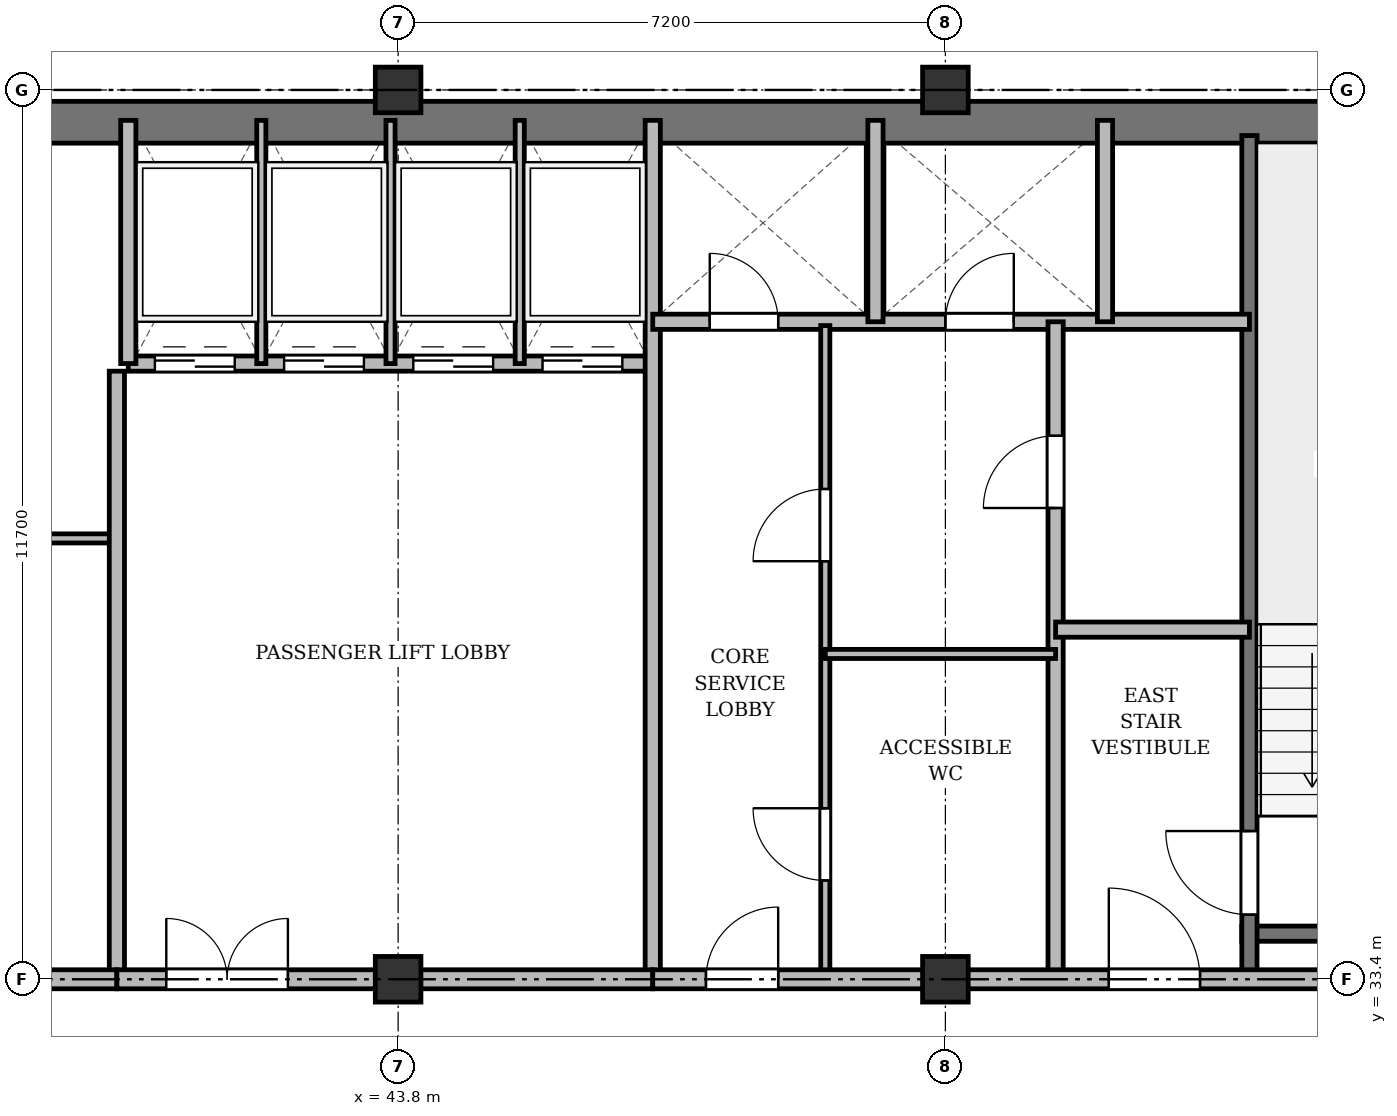
"""IFC4 building model, lengths in metres.
Left out: names, types, materials, properties, quantities, classifications, styles, units other than length and angle.
Written with IfcOpenShell. Run it as: python <this file> out.ifc"""

import sys

from ifc_helpers import new_model, si_unit, direction, frame, frame_2d, origin, origin_2d, place, context, subcontext, project, spatial, rectangle, extrude, source, transform, mapped, element, fill, save


model = new_model("IFC4")
c1 = context("Model", 3, precision=1e-05, world=origin(), true_north=direction((0.0, 1.0)))
c2 = subcontext(c1, "Body", "Model", "MODEL_VIEW")
j1 = project(units=[si_unit("LENGTHUNIT", "METRE"), si_unit("PLANEANGLEUNIT", "RADIAN")], contexts=[c1])
p1 = place(None, origin())
s1 = spatial("IfcSite", under=j1, at=p1, CompositionType="ELEMENT")
p2 = place(p1, origin())
s2 = spatial("IfcBuilding", under=s1, at=p2, CompositionType="ELEMENT")
p3 = place(p2, frame((0.0, 0.0, 263.1)))
s3 = spatial("IfcBuildingStorey", under=s2, at=p3, CompositionType="ELEMENT", Elevation=263.1)
m1 = source(origin(), c2, "Body", "SweptSolid", [
    extrude(rectangle(XDim=0.6, YDim=0.6, at=origin_2d()), origin(), (0.0, 0.0, 1.0), 3.6),
])
for number, where, z_axis, x_axis in (
    (1, (43.8, 33.4, 0.0), (0.0, 0.0, 1.0), (1.0, 0.0, 0.0)),
    (2, (43.8, 45.1, 0.0), (0.0, 0.0, 1.0), (1.0, 0.0, 0.0)),
    (3, (51.0, 33.4, 0.0), (0.0, 0.0, 1.0), (1.0, 0.0, 0.0)),
    (4, (51.0, 45.1, 0.0), (0.0, 0.0, 1.0), (1.0, 0.0, 0.0)),
):
    element("IfcColumn", number, at=place(p3, frame(where, z_axis=z_axis, x_axis=x_axis)), inside=s3, PredefinedType="COLUMN", context=c2, shape_type="MappedRepresentation", body=[
        mapped(m1, transform((0.0, 0.0, 0.0), x_axis=(1.0, 0.0, 0.0), y_axis=(0.0, 1.0, 0.0), z_axis=(0.0, 0.0, 1.0), scale=1.0)),
    ])
p4 = place(p3, frame((15.65, 44.675, 0.0), z_axis=(0.0, 0.0, 1.0), x_axis=(1.0, 0.0, 0.0)))
e5 = element("IfcWall", 5, at=p4, inside=s3, PredefinedType="SHEAR", context=c2, shape_type="SweptSolid", body=[
    extrude(rectangle(XDim=43.1, YDim=0.55, at=frame_2d((21.55, 0.0))), origin(), (0.0, 0.0, 1.0), 3.37),
])
p5 = place(p3, frame((54.9, 34.0, 0.0), z_axis=(0.0, 0.0, 1.0), x_axis=(1.0, 0.0, 0.0)))
e6 = element("IfcWall", 6, at=p5, inside=s3, PredefinedType="SHEAR", context=c2, shape_type="SweptSolid", body=[
    extrude(rectangle(XDim=3.4, YDim=0.2, at=frame_2d((1.7, 0.0))), origin(), (0.0, 0.0, 1.0), 3.37),
])
p6 = place(p3, frame((55.0, 33.4, 0.0), z_axis=(0.0, 0.0, 1.0), x_axis=(0.0, 1.0, 0.0)))
e7 = element("IfcWall", 7, at=p6, inside=s3, PredefinedType="SHEAR", context=c2, shape_type="SweptSolid", body=[
    extrude(rectangle(XDim=11.1, YDim=0.2, at=frame_2d((5.55, 0.0))), origin(), (0.0, 0.0, 1.0), 3.37),
])
p7 = place(p6, frame((0.85, 0.0, 0.0)))
e8 = element("IfcOpeningElement", 8, at=p7, cuts=e7, PredefinedType="OPENING", context=c2, shape_type="SweptSolid", body=[
    extrude(rectangle(XDim=1.1, YDim=2.15, at=frame_2d((0.55, 1.075))), frame((0.0, 0.11, 0.0), z_axis=(0.0, -1.0, 0.0), x_axis=(1.0, 0.0, 0.0)), (0.0, 0.0, 1.0), 0.22),
])
p8 = place(p3, frame((33.3, 39.2, 0.0), z_axis=(0.0, 0.0, 1.0), x_axis=(1.0, 0.0, 0.0)))
e9 = element("IfcWall", 9, at=p8, inside=s3, PredefinedType="PARTITIONING", context=c2, shape_type="SweptSolid", body=[
    extrude(rectangle(XDim=6.8, YDim=0.12, at=frame_2d((3.4, 0.0))), origin(), (0.0, 0.0, 1.0), 3.37),
])
p9 = place(p8, frame((2.6, 0.0, 0.0)))
e10 = element("IfcOpeningElement", 10, at=p9, cuts=e9, PredefinedType="OPENING", context=c2, shape_type="SweptSolid", body=[
    extrude(rectangle(XDim=0.95, YDim=2.15, at=frame_2d((0.475, 1.075))), frame((0.0, 0.07, 0.0), z_axis=(0.0, -1.0, 0.0), x_axis=(1.0, 0.0, 0.0)), (0.0, 0.0, 1.0), 0.14),
])
p10 = place(p3, frame((40.1, 33.4, 0.0), z_axis=(0.0, 0.0, 1.0), x_axis=(0.0, 1.0, 0.0)))
e11 = element("IfcWall", 11, at=p10, inside=s3, PredefinedType="SOLIDWALL", context=c2, shape_type="SweptSolid", body=[
    extrude(rectangle(XDim=8.0, YDim=0.2, at=frame_2d((4.0, 0.0))), origin(), (0.0, 0.0, 1.0), 2.92),
])
p11 = place(p3, frame((40.25, 41.5, 0.0), z_axis=(0.0, 0.0, 1.0), x_axis=(1.0, 0.0, 0.0)))
e12 = element("IfcWall", 12, at=p11, inside=s3, PredefinedType="SOLIDWALL", context=c2, shape_type="SweptSolid", body=[
    extrude(rectangle(XDim=6.9, YDim=0.2, at=frame_2d((3.45, 0.0))), origin(), (0.0, 0.0, 1.0), 3.37),
])
p12 = place(p11, frame((0.35, 0.0, 0.0)))
e13 = element("IfcOpeningElement", 13, at=p12, cuts=e12, PredefinedType="OPENING", context=c2, shape_type="SweptSolid", body=[
    extrude(rectangle(XDim=1.05, YDim=2.15, at=frame_2d((0.525, 1.075))), frame((0.0, 0.11, 0.0), z_axis=(0.0, -1.0, 0.0), x_axis=(1.0, 0.0, 0.0)), (0.0, 0.0, 1.0), 0.22),
])
p13 = place(p11, frame((2.05, 0.0, 0.0)))
e14 = element("IfcOpeningElement", 14, at=p13, cuts=e12, PredefinedType="OPENING", context=c2, shape_type="SweptSolid", body=[
    extrude(rectangle(XDim=1.05, YDim=2.15, at=frame_2d((0.525, 1.075))), frame((0.0, 0.11, 0.0), z_axis=(0.0, -1.0, 0.0), x_axis=(1.0, 0.0, 0.0)), (0.0, 0.0, 1.0), 0.22),
])
p14 = place(p11, frame((3.75, 0.0, 0.0)))
e15 = element("IfcOpeningElement", 15, at=p14, cuts=e12, PredefinedType="OPENING", context=c2, shape_type="SweptSolid", body=[
    extrude(rectangle(XDim=1.05, YDim=2.15, at=frame_2d((0.525, 1.075))), frame((0.0, 0.11, 0.0), z_axis=(0.0, -1.0, 0.0), x_axis=(1.0, 0.0, 0.0)), (0.0, 0.0, 1.0), 0.22),
])
p15 = place(p11, frame((5.45, 0.0, 0.0)))
e16 = element("IfcOpeningElement", 16, at=p15, cuts=e12, PredefinedType="OPENING", context=c2, shape_type="SweptSolid", body=[
    extrude(rectangle(XDim=1.05, YDim=2.15, at=frame_2d((0.525, 1.075))), frame((0.0, 0.11, 0.0), z_axis=(0.0, -1.0, 0.0), x_axis=(1.0, 0.0, 0.0)), (0.0, 0.0, 1.0), 0.22),
])
p16 = place(p3, frame((40.25, 41.5, 0.0), z_axis=(0.0, 0.0, 1.0), x_axis=(0.0, 1.0, 0.0)))
e17 = element("IfcWall", 17, at=p16, inside=s3, PredefinedType="SOLIDWALL", context=c2, shape_type="SweptSolid", body=[
    extrude(rectangle(XDim=3.2, YDim=0.2, at=frame_2d((1.6, 0.0))), origin(), (0.0, 0.0, 1.0), 3.37),
])
for number, where, z_axis, x_axis in (
    (18, (42.0, 41.5, 0.0), (0.0, 0.0, 1.0), (0.0, 1.0, 0.0)),
    (19, (43.7, 41.5, 0.0), (0.0, 0.0, 1.0), (0.0, 1.0, 0.0)),
    (20, (45.4, 41.5, 0.0), (0.0, 0.0, 1.0), (0.0, 1.0, 0.0)),
):
    element("IfcWall", number, at=place(p3, frame(where, z_axis=z_axis, x_axis=x_axis)), inside=s3, PredefinedType="PARTITIONING", context=c2, shape_type="SweptSolid", body=[
        extrude(rectangle(XDim=3.2, YDim=0.12, at=frame_2d((1.6, 0.0))), origin(), (0.0, 0.0, 1.0), 3.37),
    ])
p17 = place(p3, frame((47.15, 33.4, 0.0), z_axis=(0.0, 0.0, 1.0), x_axis=(0.0, 1.0, 0.0)))
e21 = element("IfcWall", 21, at=p17, inside=s3, PredefinedType="SOLIDWALL", context=c2, shape_type="SweptSolid", body=[
    extrude(rectangle(XDim=11.3, YDim=0.2, at=frame_2d((5.65, 0.0))), origin(), (0.0, 0.0, 1.0), 2.92),
])
p18 = place(p3, frame((33.3, 33.4, 0.0), z_axis=(0.0, 0.0, 1.0), x_axis=(1.0, 0.0, 0.0)))
e22 = element("IfcWall", 22, at=p18, inside=s3, PredefinedType="PARTITIONING", context=c2, shape_type="SweptSolid", body=[
    extrude(rectangle(XDim=6.8, YDim=0.25, at=frame_2d((3.4, 0.0))), origin(), (0.0, 0.0, 1.0), 2.92),
])
p19 = place(p18, frame((2.4, 0.0, 0.0)))
e23 = element("IfcOpeningElement", 23, at=p19, cuts=e22, PredefinedType="OPENING", context=c2, shape_type="SweptSolid", body=[
    extrude(rectangle(XDim=1.0, YDim=2.15, at=frame_2d((0.5, 1.075))), frame((0.0, 0.135, 0.0), z_axis=(0.0, -1.0, 0.0), x_axis=(1.0, 0.0, 0.0)), (0.0, 0.0, 1.0), 0.27),
])
p20 = place(p3, frame((40.1, 33.4, 0.0), z_axis=(0.0, 0.0, 1.0), x_axis=(1.0, 0.0, 0.0)))
e24 = element("IfcWall", 24, at=p20, inside=s3, PredefinedType="PARTITIONING", context=c2, shape_type="SweptSolid", body=[
    extrude(rectangle(XDim=7.05, YDim=0.25, at=frame_2d((3.525, 0.0))), origin(), (0.0, 0.0, 1.0), 2.92),
])
p21 = place(p20, frame((0.65, 0.0, 0.0)))
e25 = element("IfcOpeningElement", 25, at=p21, cuts=e24, PredefinedType="OPENING", context=c2, shape_type="SweptSolid", body=[
    extrude(rectangle(XDim=1.6, YDim=2.2, at=frame_2d((0.8, 1.1))), frame((0.0, 0.135, 0.0), z_axis=(0.0, -1.0, 0.0), x_axis=(1.0, 0.0, 0.0)), (0.0, 0.0, 1.0), 0.27),
])
p22 = place(p3, frame((47.15, 42.05, 0.0), z_axis=(0.0, 0.0, 1.0), x_axis=(1.0, 0.0, 0.0)))
e26 = element("IfcWall", 26, at=p22, inside=s3, PredefinedType="SOLIDWALL", context=c2, shape_type="SweptSolid", body=[
    extrude(rectangle(XDim=7.85, YDim=0.2, at=frame_2d((3.925, 0.0))), origin(), (0.0, 0.0, 1.0), 2.87),
])
p23 = place(p22, frame((0.75, 0.0, 0.0)))
e27 = element("IfcOpeningElement", 27, at=p23, cuts=e26, PredefinedType="OPENING", context=c2, shape_type="SweptSolid", body=[
    extrude(rectangle(XDim=0.9, YDim=2.1, at=frame_2d((0.45, 1.05))), frame((0.0, 0.11, 0.0), z_axis=(0.0, -1.0, 0.0), x_axis=(1.0, 0.0, 0.0)), (0.0, 0.0, 1.0), 0.22),
])
p24 = place(p22, frame((3.85, 0.0, 0.0)))
e28 = element("IfcOpeningElement", 28, at=p24, cuts=e26, PredefinedType="OPENING", context=c2, shape_type="SweptSolid", body=[
    extrude(rectangle(XDim=0.9, YDim=2.1, at=frame_2d((0.45, 1.05))), frame((0.0, 0.11, 0.0), z_axis=(0.0, -1.0, 0.0), x_axis=(1.0, 0.0, 0.0)), (0.0, 0.0, 1.0), 0.22),
])
for number, where, z_axis, x_axis in (
    (29, (50.08, 42.05, 0.0), (0.0, 0.0, 1.0), (0.0, 1.0, 0.0)),
    (30, (53.1, 42.05, 0.0), (0.0, 0.0, 1.0), (0.0, 1.0, 0.0)),
):
    element("IfcWall", number, at=place(p3, frame(where, z_axis=z_axis, x_axis=x_axis)), inside=s3, PredefinedType="SOLIDWALL", context=c2, shape_type="SweptSolid", body=[
        extrude(rectangle(XDim=2.65, YDim=0.2, at=frame_2d((1.325, 0.0))), origin(), (0.0, 0.0, 1.0), 3.37),
    ])
p25 = place(p3, frame((52.45, 33.4, 0.0), z_axis=(0.0, 0.0, 1.0), x_axis=(0.0, 1.0, 0.0)))
e31 = element("IfcWall", 31, at=p25, inside=s3, PredefinedType="PARTITIONING", context=c2, shape_type="SweptSolid", body=[
    extrude(rectangle(XDim=8.65, YDim=0.2, at=frame_2d((4.325, 0.0))), origin(), (0.0, 0.0, 1.0), 2.92),
])
p26 = place(p25, frame((6.2, 0.0, 0.0)))
e32 = element("IfcOpeningElement", 32, at=p26, cuts=e31, PredefinedType="OPENING", context=c2, shape_type="SweptSolid", body=[
    extrude(rectangle(XDim=0.95, YDim=2.15, at=frame_2d((0.475, 1.075))), frame((0.0, 0.11, 0.0), z_axis=(0.0, -1.0, 0.0), x_axis=(1.0, 0.0, 0.0)), (0.0, 0.0, 1.0), 0.22),
])
p27 = place(p3, frame((52.45, 38.0, 0.0), z_axis=(0.0, 0.0, 1.0), x_axis=(1.0, 0.0, 0.0)))
e33 = element("IfcWall", 33, at=p27, inside=s3, PredefinedType="PARTITIONING", context=c2, shape_type="SweptSolid", body=[
    extrude(rectangle(XDim=2.55, YDim=0.2, at=frame_2d((1.275, 0.0))), origin(), (0.0, 0.0, 1.0), 3.37),
])
p28 = place(p3, frame((49.42, 33.4, 0.0), z_axis=(0.0, 0.0, 1.0), x_axis=(0.0, 1.0, 0.0)))
e34 = element("IfcWall", 34, at=p28, inside=s3, PredefinedType="PARTITIONING", context=c2, shape_type="SweptSolid", body=[
    extrude(rectangle(XDim=8.6, YDim=0.12, at=frame_2d((4.3, 0.0))), origin(), (0.0, 0.0, 1.0), 2.92),
])
p29 = place(p28, frame((1.3, 0.0, 0.0)))
e35 = element("IfcOpeningElement", 35, at=p29, cuts=e34, PredefinedType="OPENING", context=c2, shape_type="SweptSolid", body=[
    extrude(rectangle(XDim=0.95, YDim=2.15, at=frame_2d((0.475, 1.075))), frame((0.0, 0.07, 0.0), z_axis=(0.0, -1.0, 0.0), x_axis=(1.0, 0.0, 0.0)), (0.0, 0.0, 1.0), 0.14),
])
p30 = place(p28, frame((5.5, 0.0, 0.0)))
e36 = element("IfcOpeningElement", 36, at=p30, cuts=e34, PredefinedType="OPENING", context=c2, shape_type="SweptSolid", body=[
    extrude(rectangle(XDim=0.95, YDim=2.15, at=frame_2d((0.475, 1.075))), frame((0.0, 0.07, 0.0), z_axis=(0.0, -1.0, 0.0), x_axis=(1.0, 0.0, 0.0)), (0.0, 0.0, 1.0), 0.14),
])
p31 = place(p3, frame((49.42, 37.68, 0.0), z_axis=(0.0, 0.0, 1.0), x_axis=(1.0, 0.0, 0.0)))
e37 = element("IfcWall", 37, at=p31, inside=s3, PredefinedType="PARTITIONING", context=c2, shape_type="SweptSolid", body=[
    extrude(rectangle(XDim=3.03, YDim=0.12, at=frame_2d((1.515, 0.0))), origin(), (0.0, 0.0, 1.0), 2.87),
])
p32 = place(p3, frame((47.15, 33.4, 0.0), z_axis=(0.0, 0.0, 1.0), x_axis=(1.0, 0.0, 0.0)))
e38 = element("IfcWall", 38, at=p32, inside=s3, PredefinedType="PARTITIONING", context=c2, shape_type="SweptSolid", body=[
    extrude(rectangle(XDim=11.15, YDim=0.25, at=frame_2d((5.575, 0.0))), origin(), (0.0, 0.0, 1.0), 2.92),
])
p33 = place(p32, frame((0.7, 0.0, 0.0)))
e39 = element("IfcOpeningElement", 39, at=p33, cuts=e38, PredefinedType="OPENING", context=c2, shape_type="SweptSolid", body=[
    extrude(rectangle(XDim=0.95, YDim=2.15, at=frame_2d((0.475, 1.075))), frame((0.0, 0.135, 0.0), z_axis=(0.0, -1.0, 0.0), x_axis=(1.0, 0.0, 0.0)), (0.0, 0.0, 1.0), 0.27),
])
p34 = place(p32, frame((6.0, 0.0, 0.0)))
e40 = element("IfcOpeningElement", 40, at=p34, cuts=e38, PredefinedType="OPENING", context=c2, shape_type="SweptSolid", body=[
    extrude(rectangle(XDim=1.2, YDim=2.15, at=frame_2d((0.6, 1.075))), frame((0.0, 0.135, 0.0), z_axis=(0.0, -1.0, 0.0), x_axis=(1.0, 0.0, 0.0)), (0.0, 0.0, 1.0), 0.27),
])
m2 = source(origin(), c2, "Body", "SweptSolid", [
    extrude(rectangle(XDim=1.1, YDim=2.15, at=frame_2d((0.55, 1.075))), frame((0.0, 0.025, 0.0), z_axis=(0.0, -1.0, 0.0), x_axis=(1.0, 0.0, 0.0)), (0.0, 0.0, 1.0), 0.05),
])
p35 = place(p7, origin())
e41 = element("IfcDoor", 41, at=p35, inside=s3, OperationType="SINGLE_SWING_RIGHT", PredefinedType="DOOR", context=c2, shape_type="MappedRepresentation", body=[
    mapped(m2, transform((0.0, 0.0, 0.0), x_axis=(1.0, 0.0, 0.0), y_axis=(0.0, 1.0, 0.0), z_axis=(0.0, 0.0, 1.0), scale=1.0)),
])
fill(e8, e41)
m3 = source(origin(), c2, "Body", "SweptSolid", [
    extrude(rectangle(XDim=1.05, YDim=2.15, at=frame_2d((0.525, 1.075))), frame((0.0, 0.025, 0.0), z_axis=(0.0, -1.0, 0.0), x_axis=(1.0, 0.0, 0.0)), (0.0, 0.0, 1.0), 0.05),
])
p36 = place(p12, origin())
e42 = element("IfcDoor", 42, at=p36, inside=s3, OperationType="DOUBLE_DOOR_SLIDING", PredefinedType="DOOR", context=c2, shape_type="MappedRepresentation", body=[
    mapped(m3, transform((0.0, 0.0, 0.0), x_axis=(1.0, 0.0, 0.0), y_axis=(0.0, 1.0, 0.0), z_axis=(0.0, 0.0, 1.0), scale=1.0)),
])
fill(e13, e42)
p37 = place(p13, origin())
e43 = element("IfcDoor", 43, at=p37, inside=s3, OperationType="DOUBLE_DOOR_SLIDING", PredefinedType="DOOR", context=c2, shape_type="MappedRepresentation", body=[
    mapped(m3, transform((0.0, 0.0, 0.0), x_axis=(1.0, 0.0, 0.0), y_axis=(0.0, 1.0, 0.0), z_axis=(0.0, 0.0, 1.0), scale=1.0)),
])
fill(e14, e43)
p38 = place(p14, origin())
e44 = element("IfcDoor", 44, at=p38, inside=s3, OperationType="DOUBLE_DOOR_SLIDING", PredefinedType="DOOR", context=c2, shape_type="MappedRepresentation", body=[
    mapped(m3, transform((0.0, 0.0, 0.0), x_axis=(1.0, 0.0, 0.0), y_axis=(0.0, 1.0, 0.0), z_axis=(0.0, 0.0, 1.0), scale=1.0)),
])
fill(e15, e44)
p39 = place(p15, origin())
e45 = element("IfcDoor", 45, at=p39, inside=s3, OperationType="DOUBLE_DOOR_SLIDING", PredefinedType="DOOR", context=c2, shape_type="MappedRepresentation", body=[
    mapped(m3, transform((0.0, 0.0, 0.0), x_axis=(1.0, 0.0, 0.0), y_axis=(0.0, 1.0, 0.0), z_axis=(0.0, 0.0, 1.0), scale=1.0)),
])
fill(e16, e45)
m4 = source(origin(), c2, "Body", "SweptSolid", [
    extrude(rectangle(XDim=1.6, YDim=2.2, at=frame_2d((0.8, 1.1))), frame((0.0, 0.025, 0.0), z_axis=(0.0, -1.0, 0.0), x_axis=(1.0, 0.0, 0.0)), (0.0, 0.0, 1.0), 0.05),
])
p40 = place(p21, origin())
e46 = element("IfcDoor", 46, at=p40, inside=s3, OperationType="DOUBLE_DOOR_SINGLE_SWING", PredefinedType="DOOR", context=c2, shape_type="MappedRepresentation", body=[
    mapped(m4, transform((0.0, 0.0, 0.0), x_axis=(1.0, 0.0, 0.0), y_axis=(0.0, 1.0, 0.0), z_axis=(0.0, 0.0, 1.0), scale=1.0)),
])
fill(e25, e46)
m5 = source(origin(), c2, "Body", "SweptSolid", [
    extrude(rectangle(XDim=0.9, YDim=2.1, at=frame_2d((0.45, 1.05))), frame((0.0, 0.025, 0.0), z_axis=(0.0, -1.0, 0.0), x_axis=(1.0, 0.0, 0.0)), (0.0, 0.0, 1.0), 0.05),
])
p41 = place(p23, origin())
e47 = element("IfcDoor", 47, at=p41, inside=s3, OperationType="SINGLE_SWING_LEFT", PredefinedType="DOOR", context=c2, shape_type="MappedRepresentation", body=[
    mapped(m5, transform((0.0, 0.0, 0.0), x_axis=(1.0, 0.0, 0.0), y_axis=(0.0, 1.0, 0.0), z_axis=(0.0, 0.0, 1.0), scale=1.0)),
])
fill(e27, e47)
p42 = place(p24, origin())
e48 = element("IfcDoor", 48, at=p42, inside=s3, OperationType="SINGLE_SWING_RIGHT", PredefinedType="DOOR", context=c2, shape_type="MappedRepresentation", body=[
    mapped(m5, transform((0.0, 0.0, 0.0), x_axis=(1.0, 0.0, 0.0), y_axis=(0.0, 1.0, 0.0), z_axis=(0.0, 0.0, 1.0), scale=1.0)),
])
fill(e28, e48)
m6 = source(origin(), c2, "Body", "SweptSolid", [
    extrude(rectangle(XDim=0.95, YDim=2.15, at=frame_2d((0.475, 1.075))), frame((0.0, 0.025, 0.0), z_axis=(0.0, -1.0, 0.0), x_axis=(1.0, 0.0, 0.0)), (0.0, 0.0, 1.0), 0.05),
])
p43 = place(p26, origin())
e49 = element("IfcDoor", 49, at=p43, inside=s3, OperationType="SINGLE_SWING_LEFT", PredefinedType="DOOR", context=c2, shape_type="MappedRepresentation", body=[
    mapped(m6, transform((0.0, 0.0, 0.0), x_axis=(1.0, 0.0, 0.0), y_axis=(0.0, 1.0, 0.0), z_axis=(0.0, 0.0, 1.0), scale=1.0)),
])
fill(e32, e49)
p44 = place(p29, origin())
e50 = element("IfcDoor", 50, at=p44, inside=s3, OperationType="SINGLE_SWING_RIGHT", PredefinedType="DOOR", context=c2, shape_type="MappedRepresentation", body=[
    mapped(m6, transform((0.0, 0.0, 0.0), x_axis=(1.0, 0.0, 0.0), y_axis=(0.0, 1.0, 0.0), z_axis=(0.0, 0.0, 1.0), scale=1.0)),
])
fill(e35, e50)
p45 = place(p30, origin())
e51 = element("IfcDoor", 51, at=p45, inside=s3, OperationType="SINGLE_SWING_LEFT", PredefinedType="DOOR", context=c2, shape_type="MappedRepresentation", body=[
    mapped(m6, transform((0.0, 0.0, 0.0), x_axis=(1.0, 0.0, 0.0), y_axis=(0.0, 1.0, 0.0), z_axis=(0.0, 0.0, 1.0), scale=1.0)),
])
fill(e36, e51)
p46 = place(p33, origin())
e52 = element("IfcDoor", 52, at=p46, inside=s3, OperationType="SINGLE_SWING_RIGHT", PredefinedType="DOOR", context=c2, shape_type="MappedRepresentation", body=[
    mapped(m6, transform((0.0, 0.0, 0.0), x_axis=(1.0, 0.0, 0.0), y_axis=(0.0, 1.0, 0.0), z_axis=(0.0, 0.0, 1.0), scale=1.0)),
])
fill(e39, e52)
m7 = source(origin(), c2, "Body", "SweptSolid", [
    extrude(rectangle(XDim=1.2, YDim=2.15, at=frame_2d((0.6, 1.075))), frame((0.0, 0.025, 0.0), z_axis=(0.0, -1.0, 0.0), x_axis=(1.0, 0.0, 0.0)), (0.0, 0.0, 1.0), 0.05),
])
p47 = place(p34, origin())
e53 = element("IfcDoor", 53, at=p47, inside=s3, OperationType="SINGLE_SWING_LEFT", PredefinedType="DOOR", context=c2, shape_type="MappedRepresentation", body=[
    mapped(m7, transform((0.0, 0.0, 0.0), x_axis=(1.0, 0.0, 0.0), y_axis=(0.0, 1.0, 0.0), z_axis=(0.0, 0.0, 1.0), scale=1.0)),
])
fill(e40, e53)
save(model, sys.argv[1])
